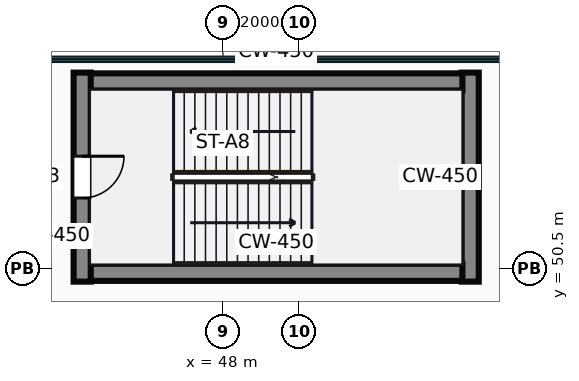
"""IFC4 building model, lengths in metres.
Left out: names, types, materials, properties, quantities, classifications, styles, units other than length and angle.
Written with IfcOpenShell. Run it as: python <this file> out.ifc"""

import sys

from ifc_helpers import new_model, si_unit, direction, frame, frame_2d, origin, place, context, subcontext, project, spatial, rectangle, extrude, source, transform, mapped, element, fill, save


model = new_model("IFC4")
c1 = context("Model", 3, precision=1e-05, world=origin(), true_north=direction((0.0, 1.0)))
c2 = subcontext(c1, "Body", "Model", "MODEL_VIEW")
j1 = project(units=[si_unit("LENGTHUNIT", "METRE"), si_unit("PLANEANGLEUNIT", "RADIAN")], contexts=[c1])
p1 = place(None, origin())
s1 = spatial("IfcSite", under=j1, at=p1, CompositionType="ELEMENT")
p2 = place(p1, origin())
s2 = spatial("IfcBuilding", under=s1, at=p2, CompositionType="ELEMENT")
p3 = place(p2, frame((0.0, 0.0, 16.0)))
s3 = spatial("IfcBuildingStorey", under=s2, at=p3, CompositionType="ELEMENT", Elevation=16.0)
m1 = source(origin(), c2, "Body", "SweptSolid", [
    extrude(rectangle(XDim=5.5, YDim=0.45, at=frame_2d((2.75, 0.0))), origin(), (0.0, 0.0, 1.0), 5.0),
])
p4 = place(p3, frame((44.295, 50.15, 0.0), z_axis=(0.0, 0.0, 1.0), x_axis=(0.0, 1.0, 0.0)))
e1 = element("IfcWall", 1, at=p4, inside=s3, PredefinedType="SHEAR", context=c2, shape_type="MappedRepresentation", body=[
    mapped(m1, transform((0.0, 0.0, 0.0))),
])
p5 = place(p4, frame((2.2, 0.0, 0.0)))
e2 = element("IfcOpeningElement", 2, at=p5, cuts=e1, PredefinedType="OPENING", context=c2, shape_type="SweptSolid", body=[
    extrude(rectangle(XDim=1.1, YDim=2.15, at=frame_2d((0.55, 1.075))), frame((0.0, 0.235, 0.0), z_axis=(0.0, -1.0, 0.0), x_axis=(1.0, 0.0, 0.0)), (0.0, 0.0, 1.0), 0.47),
])
m2 = source(origin(), c2, "Body", "SweptSolid", [
    extrude(rectangle(XDim=9.8, YDim=0.45, at=frame_2d((4.9, 0.0))), origin(), (0.0, 0.0, 1.0), 5.0),
])
for number, where, z_axis, x_axis in (
    (3, (44.5, 50.395, 0.0), (0.0, 0.0, 1.0), (1.0, 0.0, 0.0)),
    (4, (44.5, 55.405, 0.0), (0.0, 0.0, 1.0), (1.0, 0.0, 0.0)),
):
    element("IfcWall", number, at=place(p3, frame(where, z_axis=z_axis, x_axis=x_axis)), inside=s3, PredefinedType="SHEAR", context=c2, shape_type="MappedRepresentation", body=[
        mapped(m2, transform((0.0, 0.0, 0.0))),
    ])
p6 = place(p3, frame((54.505, 50.15, 0.0), z_axis=(0.0, 0.0, 1.0), x_axis=(0.0, 1.0, 0.0)))
e5 = element("IfcWall", 5, at=p6, inside=s3, PredefinedType="SHEAR", context=c2, shape_type="MappedRepresentation", body=[
    mapped(m1, transform((0.0, 0.0, 0.0))),
])
m3 = source(origin(), c2, "Body", "SweptSolid", [
    extrude(rectangle(XDim=1.1, YDim=2.15, at=frame_2d((0.55, 1.075))), frame((0.0, 0.025, 0.0), z_axis=(0.0, -1.0, 0.0), x_axis=(1.0, 0.0, 0.0)), (0.0, 0.0, 1.0), 0.05),
])
p7 = place(p5, frame((1.1, 0.0, 0.0), z_axis=(0.0, 0.0, 1.0), x_axis=(-1.0, 0.0, 0.0)))
e6 = element("IfcDoor", 6, at=p7, inside=s3, OperationType="SINGLE_SWING_RIGHT", PredefinedType="DOOR", context=c2, shape_type="MappedRepresentation", body=[
    mapped(m3, transform((0.0, 0.0, 0.0))),
])
fill(e2, e6)
save(model, sys.argv[1])
